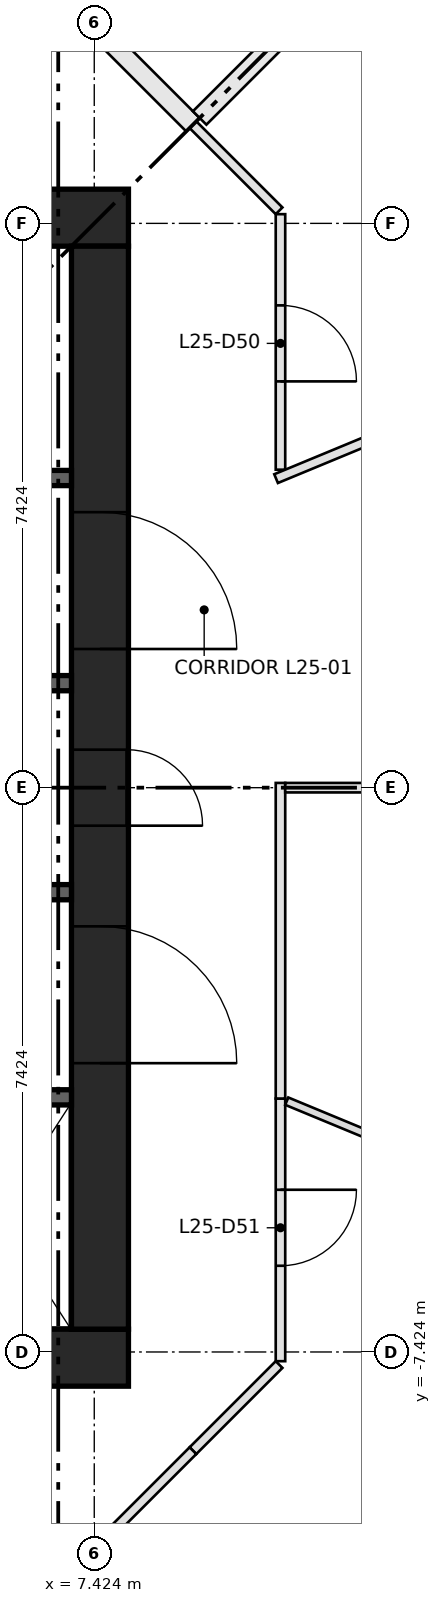
"""IFC4 building model, lengths in metres.
Left out: names, types, materials, properties, quantities, classifications, styles, units other than length and angle.
Written with IfcOpenShell. Run it as: python <this file> out.ifc"""

import sys

from ifc_helpers import new_model, si_unit, direction, frame, frame_2d, origin, place, context, subcontext, project, spatial, rectangle, extrude, element, fill, save


model = new_model("IFC4")
c1 = context("Model", 3, precision=1e-05, world=origin(), true_north=direction((0.0, 1.0)))
c2 = subcontext(c1, "Body", "Model", "MODEL_VIEW")
j1 = project(units=[si_unit("LENGTHUNIT", "METRE"), si_unit("PLANEANGLEUNIT", "RADIAN")], contexts=[c1])
p1 = place(None, origin())
s1 = spatial("IfcSite", under=j1, at=p1, CompositionType="ELEMENT")
p2 = place(p1, origin())
s2 = spatial("IfcBuilding", under=s1, at=p2, CompositionType="ELEMENT")
p3 = place(p2, frame((0.0, 0.0, 98.3)))
s3 = spatial("IfcBuildingStorey", under=s2, at=p3, CompositionType="ELEMENT", Elevation=98.3)
for number, where, z_axis, x_axis in (
    (1, (-7.874, -7.499, 0.0), (0.0, 0.0, 1.0), (1.0, 0.0, 0.0)),
    (2, (-7.874, 7.499, 0.0), (0.0, 0.0, 1.0), (1.0, 0.0, 0.0)),
):
    element("IfcWall", number, at=place(p3, frame(where, z_axis=z_axis, x_axis=x_axis)), inside=s3, PredefinedType="SHEAR", context=c2, shape_type="SweptSolid", body=[
        extrude(rectangle(XDim=15.748, YDim=0.75, at=frame_2d((7.874, 0.0))), origin(), (0.0, 0.0, 1.0), 3.65),
    ])
p4 = place(p3, frame((7.499, -7.124, 0.0), z_axis=(0.0, 0.0, 1.0), x_axis=(0.0, 1.0, 0.0)))
e3 = element("IfcWall", 3, at=p4, inside=s3, PredefinedType="SHEAR", context=c2, shape_type="SweptSolid", body=[
    extrude(rectangle(XDim=14.248, YDim=0.75, at=frame_2d((7.124, 0.0))), origin(), (0.0, 0.0, 1.0), 3.65),
])
p5 = place(p4, frame((6.624, 0.0, 0.0)))
e4 = element("IfcOpeningElement", 4, at=p5, cuts=e3, PredefinedType="OPENING", context=c2, shape_type="SweptSolid", body=[
    extrude(rectangle(XDim=1.0, YDim=2.1, at=frame_2d((0.5, 1.05))), frame((0.0, 0.385, 0.0), z_axis=(0.0, -1.0, 0.0), x_axis=(1.0, 0.0, 0.0)), (0.0, 0.0, 1.0), 0.77),
])
p6 = place(p4, frame((3.5, 0.0, 0.0)))
e5 = element("IfcOpeningElement", 5, at=p6, cuts=e3, PredefinedType="OPENING", context=c2, shape_type="SweptSolid", body=[
    extrude(rectangle(XDim=1.8, YDim=2.1, at=frame_2d((0.9, 1.05))), frame((0.0, 0.385, 0.0), z_axis=(0.0, -1.0, 0.0), x_axis=(1.0, 0.0, 0.0)), (0.0, 0.0, 1.0), 0.77),
])
p7 = place(p4, frame((8.948, 0.0, 0.0)))
e6 = element("IfcOpeningElement", 6, at=p7, cuts=e3, PredefinedType="OPENING", context=c2, shape_type="SweptSolid", body=[
    extrude(rectangle(XDim=1.8, YDim=2.1, at=frame_2d((0.9, 1.05))), frame((0.0, 0.385, 0.0), z_axis=(0.0, -1.0, 0.0), x_axis=(1.0, 0.0, 0.0)), (0.0, 0.0, 1.0), 0.77),
])
p8 = place(p3, frame((-7.124, -4.074, 0.0), z_axis=(0.0, 0.0, 1.0), x_axis=(1.0, 0.0, 0.0)))
e7 = element("IfcWall", 7, at=p8, inside=s3, PredefinedType="SHEAR", context=c2, shape_type="SweptSolid", body=[
    extrude(rectangle(XDim=14.248, YDim=0.2, at=frame_2d((7.124, 0.0))), origin(), (0.0, 0.0, 1.0), 3.3),
])
p9 = place(p8, frame((1.069, 0.0, 0.0)))
e8 = element("IfcOpeningElement", 8, at=p9, cuts=e7, PredefinedType="OPENING", context=c2, shape_type="SweptSolid", body=[
    extrude(rectangle(XDim=1.1, YDim=2.1, at=frame_2d((0.55, 1.05))), frame((0.0, 0.11, 0.0), z_axis=(0.0, -1.0, 0.0), x_axis=(1.0, 0.0, 0.0)), (0.0, 0.0, 1.0), 0.22),
])
p10 = place(p8, frame((4.206, 0.0, 0.0)))
e9 = element("IfcOpeningElement", 9, at=p10, cuts=e7, PredefinedType="OPENING", context=c2, shape_type="SweptSolid", body=[
    extrude(rectangle(XDim=1.1, YDim=2.1, at=frame_2d((0.55, 1.05))), frame((0.0, 0.11, 0.0), z_axis=(0.0, -1.0, 0.0), x_axis=(1.0, 0.0, 0.0)), (0.0, 0.0, 1.0), 0.22),
])
p11 = place(p8, frame((6.808, 0.0, 0.0)))
e10 = element("IfcOpeningElement", 10, at=p11, cuts=e7, PredefinedType="OPENING", context=c2, shape_type="SweptSolid", body=[
    extrude(rectangle(XDim=1.0, YDim=2.1, at=frame_2d((0.5, 1.05))), frame((0.0, 0.11, 0.0), z_axis=(0.0, -1.0, 0.0), x_axis=(1.0, 0.0, 0.0)), (0.0, 0.0, 1.0), 0.22),
])
p12 = place(p8, frame((8.777, 0.0, 0.0)))
e11 = element("IfcOpeningElement", 11, at=p12, cuts=e7, PredefinedType="OPENING", context=c2, shape_type="SweptSolid", body=[
    extrude(rectangle(XDim=1.0, YDim=2.1, at=frame_2d((0.5, 1.05))), frame((0.0, 0.11, 0.0), z_axis=(0.0, -1.0, 0.0), x_axis=(1.0, 0.0, 0.0)), (0.0, 0.0, 1.0), 0.22),
])
p13 = place(p8, frame((10.745, 0.0, 0.0)))
e12 = element("IfcOpeningElement", 12, at=p13, cuts=e7, PredefinedType="OPENING", context=c2, shape_type="SweptSolid", body=[
    extrude(rectangle(XDim=1.0, YDim=2.1, at=frame_2d((0.5, 1.05))), frame((0.0, 0.11, 0.0), z_axis=(0.0, -1.0, 0.0), x_axis=(1.0, 0.0, 0.0)), (0.0, 0.0, 1.0), 0.22),
])
p14 = place(p8, frame((12.714, 0.0, 0.0)))
e13 = element("IfcOpeningElement", 13, at=p14, cuts=e7, PredefinedType="OPENING", context=c2, shape_type="SweptSolid", body=[
    extrude(rectangle(XDim=1.0, YDim=2.1, at=frame_2d((0.5, 1.05))), frame((0.0, 0.11, 0.0), z_axis=(0.0, -1.0, 0.0), x_axis=(1.0, 0.0, 0.0)), (0.0, 0.0, 1.0), 0.22),
])
p15 = place(p3, frame((0.0, 4.074, 0.0), z_axis=(0.0, 0.0, 1.0), x_axis=(1.0, 0.0, 0.0)))
e14 = element("IfcWall", 14, at=p15, inside=s3, PredefinedType="SHEAR", context=c2, shape_type="SweptSolid", body=[
    extrude(rectangle(XDim=7.124, YDim=0.2, at=frame_2d((3.562, 0.0))), origin(), (0.0, 0.0, 1.0), 3.3),
])
p16 = place(p15, frame((0.754, 0.0, 0.0)))
e15 = element("IfcOpeningElement", 15, at=p16, cuts=e14, PredefinedType="OPENING", context=c2, shape_type="SweptSolid", body=[
    extrude(rectangle(XDim=1.0, YDim=2.1, at=frame_2d((0.5, 1.05))), frame((0.0, 0.11, 0.0), z_axis=(0.0, -1.0, 0.0), x_axis=(1.0, 0.0, 0.0)), (0.0, 0.0, 1.0), 0.22),
])
p17 = place(p15, frame((3.407, 0.0, 0.0)))
e16 = element("IfcOpeningElement", 16, at=p17, cuts=e14, PredefinedType="OPENING", context=c2, shape_type="SweptSolid", body=[
    extrude(rectangle(XDim=1.0, YDim=2.1, at=frame_2d((0.5, 1.05))), frame((0.0, 0.11, 0.0), z_axis=(0.0, -1.0, 0.0), x_axis=(1.0, 0.0, 0.0)), (0.0, 0.0, 1.0), 0.22),
])
p18 = place(p15, frame((5.79, 0.0, 0.0)))
e17 = element("IfcOpeningElement", 17, at=p18, cuts=e14, PredefinedType="OPENING", context=c2, shape_type="SweptSolid", body=[
    extrude(rectangle(XDim=0.8, YDim=2.1, at=frame_2d((0.4, 1.05))), frame((0.0, 0.11, 0.0), z_axis=(0.0, -1.0, 0.0), x_axis=(1.0, 0.0, 0.0)), (0.0, 0.0, 1.0), 0.22),
])
for number, where, z_axis, x_axis in (
    (18, (4.374, -1.375, 0.0), (0.0, 0.0, 1.0), (1.0, 0.0, 0.0)),
    (19, (4.374, 1.375, 0.0), (0.0, 0.0, 1.0), (1.0, 0.0, 0.0)),
):
    element("IfcWall", number, at=place(p3, frame(where, z_axis=z_axis, x_axis=x_axis)), inside=s3, PredefinedType="SHEAR", context=c2, shape_type="SweptSolid", body=[
        extrude(rectangle(XDim=2.75, YDim=0.2, at=frame_2d((1.375, 0.0))), origin(), (0.0, 0.0, 1.0), 3.3),
    ])
p19 = place(p3, frame((8.722, 8.722, 0.0), z_axis=(0.0, 0.0, 1.0), x_axis=(0.70718294931, -0.707030604857, 0.0)))
e20 = element("IfcWall", 20, at=p19, inside=s3, PredefinedType="PARTITIONING", context=c2, shape_type="SweptSolid", body=[
    extrude(rectangle(XDim=1.603, YDim=0.125, at=frame_2d((0.801, 0.0))), origin(), (0.0, 0.0, 1.0), 3.3),
])
p20 = place(p3, frame((9.874, 7.545, 0.0), z_axis=(0.0, 0.0, 1.0), x_axis=(0.0, -1.0, 0.0)))
e21 = element("IfcWall", 21, at=p20, inside=s3, PredefinedType="PARTITIONING", context=c2, shape_type="SweptSolid", body=[
    extrude(rectangle(XDim=3.362, YDim=0.125, at=frame_2d((1.681, 0.0))), origin(), (0.0, 0.0, 1.0), 3.3),
])
p21 = place(p20, frame((1.2, 0.0, 0.0)))
e22 = element("IfcOpeningElement", 22, at=p21, cuts=e21, PredefinedType="OPENING", context=c2, shape_type="SweptSolid", body=[
    extrude(rectangle(XDim=1.0, YDim=2.1, at=frame_2d((0.5, 1.05))), frame((0.0, 0.073, 0.0), z_axis=(0.0, -1.0, 0.0), x_axis=(1.0, 0.0, 0.0)), (0.0, 0.0, 1.0), 0.145),
])
p22 = place(p3, frame((9.856, -7.589, 0.0), z_axis=(0.0, 0.0, 1.0), x_axis=(-0.70718294931, -0.707030604857, 0.0)))
e23 = element("IfcWall", 23, at=p22, inside=s3, PredefinedType="PARTITIONING", context=c2, shape_type="SweptSolid", body=[
    extrude(rectangle(XDim=1.603, YDim=0.125, at=frame_2d((0.801, 0.0))), origin(), (0.0, 0.0, 1.0), 3.3),
])
p23 = place(p3, frame((9.874, -4.09, 0.0), z_axis=(0.0, 0.0, 1.0), x_axis=(0.0, -1.0, 0.0)))
e24 = element("IfcWall", 24, at=p23, inside=s3, PredefinedType="PARTITIONING", context=c2, shape_type="SweptSolid", body=[
    extrude(rectangle(XDim=3.455, YDim=0.125, at=frame_2d((1.728, 0.0))), origin(), (0.0, 0.0, 1.0), 3.3),
])
p24 = place(p23, frame((1.2, 0.0, 0.0)))
e25 = element("IfcOpeningElement", 25, at=p24, cuts=e24, PredefinedType="OPENING", context=c2, shape_type="SweptSolid", body=[
    extrude(rectangle(XDim=1.0, YDim=2.1, at=frame_2d((0.5, 1.05))), frame((0.0, 0.073, 0.0), z_axis=(0.0, -1.0, 0.0), x_axis=(1.0, 0.0, 0.0)), (0.0, 0.0, 1.0), 0.145),
])
p25 = place(p3, frame((9.874, 0.062, 0.0), z_axis=(0.0, 0.0, 1.0), x_axis=(0.0, -1.0, 0.0)))
e26 = element("IfcWall", 26, at=p25, inside=s3, PredefinedType="PARTITIONING", context=c2, shape_type="SweptSolid", body=[
    extrude(rectangle(XDim=4.152, YDim=0.125, at=frame_2d((2.076, 0.0))), origin(), (0.0, 0.0, 1.0), 3.3),
])
p26 = place(p3, frame((7.608, 9.837, 0.0), z_axis=(0.0, 0.0, 1.0), x_axis=(0.707029353672, -0.707184200224, 0.0)))
e27 = element("IfcWall", 27, at=p26, inside=s3, PredefinedType="PARTITIONING", context=c2, shape_type="SweptSolid", body=[
    extrude(rectangle(XDim=1.577, YDim=0.25, at=frame_2d((0.788, 0.0))), origin(), (0.0, 0.0, 1.0), 3.3),
])
p27 = place(p3, frame((8.722, -8.722, 0.0), z_axis=(0.0, 0.0, 1.0), x_axis=(-0.707030604857, -0.70718294931, 0.0)))
e28 = element("IfcWall", 28, at=p27, inside=s3, PredefinedType="PARTITIONING", context=c2, shape_type="SweptSolid", body=[
    extrude(rectangle(XDim=1.603, YDim=0.125, at=frame_2d((0.801, 0.0))), origin(), (0.0, 0.0, 1.0), 3.3),
])
p28 = place(p3, frame((9.816, 4.066, 0.0), z_axis=(0.0, 0.0, 1.0), x_axis=(0.923881608957, 0.382678419342, 0.0)))
e29 = element("IfcWall", 29, at=p28, inside=s3, PredefinedType="PARTITIONING", context=c2, shape_type="SweptSolid", body=[
    extrude(rectangle(XDim=3.895, YDim=0.125, at=frame_2d((1.947, 0.0))), origin(), (0.0, 0.0, 1.0), 3.3),
])
p29 = place(p3, frame((14.52, 0.0, 0.0), z_axis=(0.0, 0.0, 1.0), x_axis=(-1.0, 0.0, 0.0)))
e30 = element("IfcWall", 30, at=p29, inside=s3, PredefinedType="PARTITIONING", context=c2, shape_type="SweptSolid", body=[
    extrude(rectangle(XDim=4.583, YDim=0.125, at=frame_2d((2.292, 0.0))), origin(), (0.0, 0.0, 1.0), 3.3),
])
p30 = place(p29, frame((1.8, 0.0, 0.0)))
e31 = element("IfcOpeningElement", 31, at=p30, cuts=e30, PredefinedType="OPENING", context=c2, shape_type="SweptSolid", body=[
    extrude(rectangle(XDim=1.0, YDim=2.1, at=frame_2d((0.5, 1.05))), frame((0.0, 0.073, 0.0), z_axis=(0.0, -1.0, 0.0), x_axis=(1.0, 0.0, 0.0)), (0.0, 0.0, 1.0), 0.145),
])
p31 = place(p3, frame((12.792, 12.792, 0.0), z_axis=(0.0, 0.0, 1.0), x_axis=(-0.707106781187, -0.707106781187, 0.0)))
e32 = element("IfcWall", 32, at=p31, inside=s3, PredefinedType="PARTITIONING", context=c2, shape_type="SweptSolid", body=[
    extrude(rectangle(XDim=5.63, YDim=0.25, at=frame_2d((2.815, 0.0))), origin(), (0.0, 0.0, 1.0), 3.3),
])
p32 = place(p3, frame((9.957, -4.124, 0.0), z_axis=(0.0, 0.0, 1.0), x_axis=(0.923887259949, -0.382664776147, 0.0)))
e33 = element("IfcWall", 33, at=p32, inside=s3, PredefinedType="PARTITIONING", context=c2, shape_type="SweptSolid", body=[
    extrude(rectangle(XDim=3.743, YDim=0.105, at=frame_2d((1.872, 0.0))), origin(), (0.0, 0.0, 1.0), 3.3),
])
p33 = place(p5, frame((1.0, 0.0, 0.0), z_axis=(0.0, 0.0, 1.0), x_axis=(-1.0, 0.0, 0.0)))
e34 = element("IfcDoor", 34, at=p33, inside=s3, OperationType="SINGLE_SWING_LEFT", PredefinedType="DOOR", context=c2, shape_type="SweptSolid", body=[
    extrude(rectangle(XDim=1.0, YDim=2.1, at=frame_2d((0.5, 1.05))), frame((0.0, 0.375, 0.0), z_axis=(0.0, -1.0, 0.0), x_axis=(1.0, 0.0, 0.0)), (0.0, 0.0, 1.0), 0.05),
])
fill(e4, e34)
p34 = place(p6, frame((1.8, 0.0, 0.0), z_axis=(0.0, 0.0, 1.0), x_axis=(-1.0, 0.0, 0.0)))
e35 = element("IfcDoor", 35, at=p34, inside=s3, OperationType="DOUBLE_DOOR_SINGLE_SWING", PredefinedType="DOOR", context=c2, shape_type="SweptSolid", body=[
    extrude(rectangle(XDim=1.8, YDim=2.1, at=frame_2d((0.9, 1.05))), frame((0.0, 0.025, 0.0), z_axis=(0.0, -1.0, 0.0), x_axis=(1.0, 0.0, 0.0)), (0.0, 0.0, 1.0), 0.05),
])
fill(e5, e35)
p35 = place(p7, frame((1.8, 0.0, 0.0), z_axis=(0.0, 0.0, 1.0), x_axis=(-1.0, 0.0, 0.0)))
e36 = element("IfcDoor", 36, at=p35, inside=s3, OperationType="DOUBLE_DOOR_SINGLE_SWING", PredefinedType="DOOR", context=c2, shape_type="SweptSolid", body=[
    extrude(rectangle(XDim=1.8, YDim=2.1, at=frame_2d((0.9, 1.05))), frame((0.0, 0.025, 0.0), z_axis=(0.0, -1.0, 0.0), x_axis=(1.0, 0.0, 0.0)), (0.0, 0.0, 1.0), 0.05),
])
fill(e6, e36)
p36 = place(p21, origin())
e37 = element("IfcDoor", 37, at=p36, inside=s3, OperationType="SINGLE_SWING_RIGHT", PredefinedType="DOOR", context=c2, shape_type="SweptSolid", body=[
    extrude(rectangle(XDim=1.0, YDim=2.1, at=frame_2d((0.5, 1.05))), frame((0.0, 0.025, 0.0), z_axis=(0.0, -1.0, 0.0), x_axis=(1.0, 0.0, 0.0)), (0.0, 0.0, 1.0), 0.05),
])
fill(e22, e37)
p37 = place(p24, origin())
e38 = element("IfcDoor", 38, at=p37, inside=s3, OperationType="SINGLE_SWING_LEFT", PredefinedType="DOOR", context=c2, shape_type="SweptSolid", body=[
    extrude(rectangle(XDim=1.0, YDim=2.1, at=frame_2d((0.5, 1.05))), frame((0.0, 0.025, 0.0), z_axis=(0.0, -1.0, 0.0), x_axis=(1.0, 0.0, 0.0)), (0.0, 0.0, 1.0), 0.05),
])
fill(e25, e38)
save(model, sys.argv[1])
